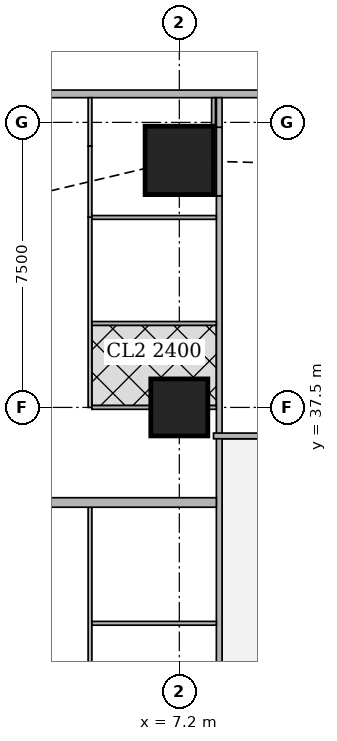
"""IFC4 building model, lengths in metres.
Left out: names, types, materials, properties, quantities, classifications, styles, units other than length and angle.
Written with IfcOpenShell. Run it as: python <this file> out.ifc"""

import sys

from ifc_helpers import new_model, si_unit, direction, frame, frame_2d, origin, origin_2d, place, context, subcontext, project, spatial, rectangle, extrude, element, fill, save


model = new_model("IFC4")
c1 = context("Model", 3, precision=1e-05, world=origin(), true_north=direction((0.0, 1.0)))
c2 = subcontext(c1, "Body", "Model", "MODEL_VIEW")
j1 = project(units=[si_unit("LENGTHUNIT", "METRE"), si_unit("PLANEANGLEUNIT", "RADIAN")], contexts=[c1])
p1 = place(None, origin())
s1 = spatial("IfcSite", under=j1, at=p1, CompositionType="ELEMENT")
p2 = place(p1, origin())
s2 = spatial("IfcBuilding", under=s1, at=p2, CompositionType="ELEMENT")
p3 = place(p2, frame((0.0, 0.0, 169.55)))
s3 = spatial("IfcBuildingStorey", under=s2, at=p3, CompositionType="ELEMENT", Elevation=169.55)
p4 = place(p3, frame((7.2, 37.5, 0.0), z_axis=(0.0, 0.0, 1.0), x_axis=(1.0, 0.0, 0.0)))
e1 = element("IfcColumn", 1, at=p4, inside=s3, PredefinedType="COLUMN", context=c2, shape_type="SweptSolid", body=[
    extrude(rectangle(XDim=1.5, YDim=1.5, at=origin_2d()), origin(), (0.0, 0.0, 1.0), 3.75),
])
p5 = place(p3, frame((7.2, 44.0, 0.0), z_axis=(0.0, 0.0, 1.0), x_axis=(1.0, 0.0, 0.0)))
e2 = element("IfcColumn", 2, at=p5, inside=s3, PredefinedType="COLUMN", context=c2, shape_type="SweptSolid", body=[
    extrude(rectangle(XDim=1.8, YDim=1.8, at=origin_2d()), origin(), (0.0, 0.0, 1.0), 3.75),
])
p6 = place(p3, frame((40.106, 45.75, 0.0), z_axis=(0.0, 0.0, 1.0), x_axis=(-1.0, 0.0, 0.0)))
e3 = element("IfcWall", 3, at=p6, inside=s3, PredefinedType="SOLIDWALL", context=c2, shape_type="SweptSolid", body=[
    extrude(rectangle(XDim=37.943, YDim=0.2, at=frame_2d((18.971, 0.0))), origin(), (0.0, 0.0, 1.0), 3.5),
])
p7 = place(p6, frame((8.606, 0.0, 0.9)))
e4 = element("IfcOpeningElement", 4, at=p7, cuts=e3, PredefinedType="OPENING", context=c2, shape_type="SweptSolid", body=[
    extrude(rectangle(XDim=1.8, YDim=1.5, at=frame_2d((0.9, 0.75))), frame((0.0, 0.11, 0.0), z_axis=(0.0, -1.0, 0.0), x_axis=(1.0, 0.0, 0.0)), (0.0, 0.0, 1.0), 0.22),
])
p8 = place(p6, frame((12.206, 0.0, 0.9)))
e5 = element("IfcOpeningElement", 5, at=p8, cuts=e3, PredefinedType="OPENING", context=c2, shape_type="SweptSolid", body=[
    extrude(rectangle(XDim=1.8, YDim=1.5, at=frame_2d((0.9, 0.75))), frame((0.0, 0.11, 0.0), z_axis=(0.0, -1.0, 0.0), x_axis=(1.0, 0.0, 0.0)), (0.0, 0.0, 1.0), 0.22),
])
p9 = place(p6, frame((15.806, 0.0, 0.9)))
e6 = element("IfcOpeningElement", 6, at=p9, cuts=e3, PredefinedType="OPENING", context=c2, shape_type="SweptSolid", body=[
    extrude(rectangle(XDim=1.8, YDim=1.5, at=frame_2d((0.9, 0.75))), frame((0.0, 0.11, 0.0), z_axis=(0.0, -1.0, 0.0), x_axis=(1.0, 0.0, 0.0)), (0.0, 0.0, 1.0), 0.22),
])
p10 = place(p6, frame((19.406, 0.0, 0.9)))
e7 = element("IfcOpeningElement", 7, at=p10, cuts=e3, PredefinedType="OPENING", context=c2, shape_type="SweptSolid", body=[
    extrude(rectangle(XDim=1.8, YDim=1.5, at=frame_2d((0.9, 0.75))), frame((0.0, 0.11, 0.0), z_axis=(0.0, -1.0, 0.0), x_axis=(1.0, 0.0, 0.0)), (0.0, 0.0, 1.0), 0.22),
])
p11 = place(p6, frame((23.006, 0.0, 0.9)))
e8 = element("IfcOpeningElement", 8, at=p11, cuts=e3, PredefinedType="OPENING", context=c2, shape_type="SweptSolid", body=[
    extrude(rectangle(XDim=1.8, YDim=1.5, at=frame_2d((0.9, 0.75))), frame((0.0, 0.11, 0.0), z_axis=(0.0, -1.0, 0.0), x_axis=(1.0, 0.0, 0.0)), (0.0, 0.0, 1.0), 0.22),
])
p12 = place(p6, frame((26.606, 0.0, 0.9)))
e9 = element("IfcOpeningElement", 9, at=p12, cuts=e3, PredefinedType="OPENING", context=c2, shape_type="SweptSolid", body=[
    extrude(rectangle(XDim=1.8, YDim=1.5, at=frame_2d((0.9, 0.75))), frame((0.0, 0.11, 0.0), z_axis=(0.0, -1.0, 0.0), x_axis=(1.0, 0.0, 0.0)), (0.0, 0.0, 1.0), 0.22),
])
p13 = place(p3, frame((8.25, 1.957, 0.0), z_axis=(0.0, 0.0, 1.0), x_axis=(0.0, 1.0, 0.0)))
e10 = element("IfcWall", 10, at=p13, inside=s3, PredefinedType="SOLIDWALL", context=c2, shape_type="SweptSolid", body=[
    extrude(rectangle(XDim=41.111, YDim=0.15, at=frame_2d((20.556, 0.0))), origin(), (0.0, 0.0, 1.0), 3.5),
])
p14 = place(p13, frame((10.642, 0.0, 0.0)))
e11 = element("IfcOpeningElement", 11, at=p14, cuts=e10, PredefinedType="OPENING", context=c2, shape_type="SweptSolid", body=[
    extrude(rectangle(XDim=1.0, YDim=2.1, at=frame_2d((0.5, 1.05))), frame((0.0, 0.085, 0.0), z_axis=(0.0, -1.0, 0.0), x_axis=(1.0, 0.0, 0.0)), (0.0, 0.0, 1.0), 0.17),
])
p15 = place(p13, frame((15.042, 0.0, 0.0)))
e12 = element("IfcOpeningElement", 12, at=p15, cuts=e10, PredefinedType="OPENING", context=c2, shape_type="SweptSolid", body=[
    extrude(rectangle(XDim=1.0, YDim=2.1, at=frame_2d((0.5, 1.05))), frame((0.0, 0.085, 0.0), z_axis=(0.0, -1.0, 0.0), x_axis=(1.0, 0.0, 0.0)), (0.0, 0.0, 1.0), 0.17),
])
p16 = place(p13, frame((22.543, 0.0, 0.0)))
e13 = element("IfcOpeningElement", 13, at=p16, cuts=e10, PredefinedType="OPENING", context=c2, shape_type="SweptSolid", body=[
    extrude(rectangle(XDim=1.0, YDim=2.1, at=frame_2d((0.5, 1.05))), frame((0.0, 0.085, 0.0), z_axis=(0.0, -1.0, 0.0), x_axis=(1.0, 0.0, 0.0)), (0.0, 0.0, 1.0), 0.17),
])
p17 = place(p13, frame((33.142, 0.0, 0.0)))
e14 = element("IfcOpeningElement", 14, at=p17, cuts=e10, PredefinedType="OPENING", context=c2, shape_type="SweptSolid", body=[
    extrude(rectangle(XDim=1.0, YDim=2.1, at=frame_2d((0.5, 1.05))), frame((0.0, 0.085, 0.0), z_axis=(0.0, -1.0, 0.0), x_axis=(1.0, 0.0, 0.0)), (0.0, 0.0, 1.0), 0.17),
])
p18 = place(p3, frame((8.25, 43.068, 0.0), z_axis=(0.0, 0.0, 1.0), x_axis=(0.0, 1.0, 0.0)))
e15 = element("IfcWall", 15, at=p18, inside=s3, PredefinedType="SOLIDWALL", context=c2, shape_type="SweptSolid", body=[
    extrude(rectangle(XDim=1.805, YDim=0.15, at=frame_2d((0.902, 0.0))), origin(), (0.0, 0.0, 1.0), 2.1),
])
p19 = place(p3, frame((8.25, 44.873, 0.0), z_axis=(0.0, 0.0, 1.0), x_axis=(0.0, 1.0, 0.0)))
e16 = element("IfcWall", 16, at=p19, inside=s3, PredefinedType="SOLIDWALL", context=c2, shape_type="SweptSolid", body=[
    extrude(rectangle(XDim=0.777, YDim=0.15, at=frame_2d((0.388, 0.0))), origin(), (0.0, 0.0, 1.0), 3.5),
])
p20 = place(p3, frame((8.1, 36.75, 0.0), z_axis=(0.0, 0.0, 1.0), x_axis=(1.0, 0.0, 0.0)))
e17 = element("IfcWall", 17, at=p20, inside=s3, PredefinedType="SOLIDWALL", context=c2, shape_type="SweptSolid", body=[
    extrude(rectangle(XDim=5.549, YDim=0.15, at=frame_2d((2.774, 0.0))), origin(), (0.0, 0.0, 1.0), 3.5),
])
p21 = place(p20, frame((2.725, 0.0, 0.0)))
e18 = element("IfcOpeningElement", 18, at=p21, cuts=e17, PredefinedType="OPENING", context=c2, shape_type="SweptSolid", body=[
    extrude(rectangle(XDim=1.0, YDim=2.1, at=frame_2d((0.5, 1.05))), frame((0.0, 0.085, 0.0), z_axis=(0.0, -1.0, 0.0), x_axis=(1.0, 0.0, 0.0)), (0.0, 0.0, 1.0), 0.17),
])
p22 = place(p3, frame((8.1, 45.65, 0.0), z_axis=(0.0, 0.0, 1.0), x_axis=(0.0, -1.0, 0.0)))
e19 = element("IfcWall", 19, at=p22, inside=s3, PredefinedType="PARTITIONING", context=c2, shape_type="SweptSolid", body=[
    extrude(rectangle(XDim=0.749, YDim=0.1, at=frame_2d((0.375, 0.0))), origin(), (0.0, 0.0, 1.0), 3.5),
])
p23 = place(p3, frame((4.85, 27.499, 0.0), z_axis=(0.0, 0.0, 1.0), x_axis=(0.0, 1.0, 0.0)))
e20 = element("IfcWall", 20, at=p23, inside=s3, PredefinedType="PARTITIONING", context=c2, shape_type="SweptSolid", body=[
    extrude(rectangle(XDim=7.375, YDim=0.1, at=frame_2d((3.688, 0.0))), origin(), (0.0, 0.0, 1.0), 3.5),
])
p24 = place(p23, frame((0.8, 0.0, 0.0)))
e21 = element("IfcOpeningElement", 21, at=p24, cuts=e20, PredefinedType="OPENING", context=c2, shape_type="SweptSolid", body=[
    extrude(rectangle(XDim=0.9, YDim=2.1, at=frame_2d((0.45, 1.05))), frame((0.0, 0.06, 0.0), z_axis=(0.0, -1.0, 0.0), x_axis=(1.0, 0.0, 0.0)), (0.0, 0.0, 1.0), 0.12),
])
p25 = place(p23, frame((2.961, 0.0, 0.0)))
e22 = element("IfcOpeningElement", 22, at=p25, cuts=e20, PredefinedType="OPENING", context=c2, shape_type="SweptSolid", body=[
    extrude(rectangle(XDim=0.9, YDim=2.1, at=frame_2d((0.45, 1.05))), frame((0.0, 0.06, 0.0), z_axis=(0.0, -1.0, 0.0), x_axis=(1.0, 0.0, 0.0)), (0.0, 0.0, 1.0), 0.12),
])
p26 = place(p23, frame((5.461, 0.0, 0.0)))
e23 = element("IfcOpeningElement", 23, at=p26, cuts=e20, PredefinedType="OPENING", context=c2, shape_type="SweptSolid", body=[
    extrude(rectangle(XDim=0.9, YDim=2.1, at=frame_2d((0.45, 1.05))), frame((0.0, 0.06, 0.0), z_axis=(0.0, -1.0, 0.0), x_axis=(1.0, 0.0, 0.0)), (0.0, 0.0, 1.0), 0.12),
])
p27 = place(p3, frame((4.9, 31.82, 0.0), z_axis=(0.0, 0.0, 1.0), x_axis=(1.0, 0.0, 0.0)))
e24 = element("IfcWall", 24, at=p27, inside=s3, PredefinedType="PARTITIONING", context=c2, shape_type="SweptSolid", body=[
    extrude(rectangle(XDim=3.275, YDim=0.1, at=frame_2d((1.638, 0.0))), origin(), (0.0, 0.0, 1.0), 3.5),
])
p28 = place(p3, frame((4.85, 37.5, 0.0), z_axis=(0.0, 0.0, 1.0), x_axis=(0.0, 1.0, 0.0)))
e25 = element("IfcWall", 25, at=p28, inside=s3, PredefinedType="PARTITIONING", context=c2, shape_type="SweptSolid", body=[
    extrude(rectangle(XDim=5.007, YDim=0.1, at=frame_2d((2.503, 0.0))), origin(), (0.0, 0.0, 1.0), 3.5),
])
p29 = place(p28, frame((0.655, 0.0, 0.0)))
e26 = element("IfcOpeningElement", 26, at=p29, cuts=e25, PredefinedType="OPENING", context=c2, shape_type="SweptSolid", body=[
    extrude(rectangle(XDim=0.9, YDim=2.1, at=frame_2d((0.45, 1.05))), frame((0.0, 0.06, 0.0), z_axis=(0.0, -1.0, 0.0), x_axis=(1.0, 0.0, 0.0)), (0.0, 0.0, 1.0), 0.12),
])
p30 = place(p28, frame((3.155, 0.0, 0.0)))
e27 = element("IfcOpeningElement", 27, at=p30, cuts=e25, PredefinedType="OPENING", context=c2, shape_type="SweptSolid", body=[
    extrude(rectangle(XDim=0.9, YDim=2.1, at=frame_2d((0.45, 1.05))), frame((0.0, 0.06, 0.0), z_axis=(0.0, -1.0, 0.0), x_axis=(1.0, 0.0, 0.0)), (0.0, 0.0, 1.0), 0.12),
])
p31 = place(p3, frame((4.85, 42.507, 0.0), z_axis=(0.0, 0.0, 1.0), x_axis=(0.0, 1.0, 0.0)))
e28 = element("IfcWall", 28, at=p31, inside=s3, PredefinedType="PARTITIONING", context=c2, shape_type="SweptSolid", body=[
    extrude(rectangle(XDim=1.874, YDim=0.1, at=frame_2d((0.937, 0.0))), origin(), (0.0, 0.0, 1.0), 2.1),
])
p32 = place(p3, frame((4.85, 44.381, 0.0), z_axis=(0.0, 0.0, 1.0), x_axis=(0.0, 1.0, 0.0)))
e29 = element("IfcWall", 29, at=p32, inside=s3, PredefinedType="PARTITIONING", context=c2, shape_type="SweptSolid", body=[
    extrude(rectangle(XDim=1.269, YDim=0.1, at=frame_2d((0.634, 0.0))), origin(), (0.0, 0.0, 1.0), 3.5),
])
p33 = place(p32, frame((0.15, 0.0, 0.0)))
e30 = element("IfcOpeningElement", 30, at=p33, cuts=e29, PredefinedType="OPENING", context=c2, shape_type="SweptSolid", body=[
    extrude(rectangle(XDim=0.9, YDim=2.1, at=frame_2d((0.45, 1.05))), frame((0.0, 0.06, 0.0), z_axis=(0.0, -1.0, 0.0), x_axis=(1.0, 0.0, 0.0)), (0.0, 0.0, 1.0), 0.12),
])
p34 = place(p3, frame((4.9, 37.5, 0.0), z_axis=(0.0, 0.0, 1.0), x_axis=(1.0, 0.0, 0.0)))
e31 = element("IfcWall", 31, at=p34, inside=s3, PredefinedType="PARTITIONING", context=c2, shape_type="SweptSolid", body=[
    extrude(rectangle(XDim=1.549, YDim=0.1, at=frame_2d((0.774, 0.0))), origin(), (0.0, 0.0, 1.0), 3.5),
])
p35 = place(p3, frame((7.951, 37.5, 0.0), z_axis=(0.0, 0.0, 1.0), x_axis=(1.0, 0.0, 0.0)))
e32 = element("IfcWall", 32, at=p35, inside=s3, PredefinedType="PARTITIONING", context=c2, shape_type="SweptSolid", body=[
    extrude(rectangle(XDim=0.224, YDim=0.1, at=frame_2d((0.112, 0.0))), origin(), (0.0, 0.0, 1.0), 3.5),
])
for number, where, z_axis, x_axis in (
    (33, (4.9, 42.499, 0.0), (0.0, 0.0, 1.0), (1.0, 0.0, 0.0)),
    (34, (4.9, 39.71, 0.0), (0.0, 0.0, 1.0), (1.0, 0.0, 0.0)),
):
    element("IfcWall", number, at=place(p3, frame(where, z_axis=z_axis, x_axis=x_axis)), inside=s3, PredefinedType="PARTITIONING", context=c2, shape_type="SweptSolid", body=[
        extrude(rectangle(XDim=3.275, YDim=0.1, at=frame_2d((1.638, 0.0))), origin(), (0.0, 0.0, 1.0), 3.5),
    ])
p36 = place(p3, frame((3.65, 34.999, 0.0), z_axis=(0.0, 0.0, 1.0), x_axis=(1.0, 0.0, 0.0)))
e35 = element("IfcWall", 35, at=p36, inside=s3, PredefinedType="SOLIDWALL", context=c2, shape_type="SweptSolid", body=[
    extrude(rectangle(XDim=4.525, YDim=0.25, at=frame_2d((2.263, 0.0))), origin(), (0.0, 0.0, 1.0), 3.5),
])
p37 = place(p25, origin())
e36 = element("IfcDoor", 36, at=p37, inside=s3, OperationType="SINGLE_SWING_LEFT", PredefinedType="DOOR", context=c2, shape_type="SweptSolid", body=[
    extrude(rectangle(XDim=0.9, YDim=2.1, at=frame_2d((0.45, 1.05))), frame((0.0, 0.025, 0.0), z_axis=(0.0, -1.0, 0.0), x_axis=(1.0, 0.0, 0.0)), (0.0, 0.0, 1.0), 0.05),
])
fill(e22, e36)
p38 = place(p26, origin())
e37 = element("IfcDoor", 37, at=p38, inside=s3, OperationType="SINGLE_SWING_LEFT", PredefinedType="DOOR", context=c2, shape_type="SweptSolid", body=[
    extrude(rectangle(XDim=0.9, YDim=2.1, at=frame_2d((0.45, 1.05))), frame((0.0, 0.025, 0.0), z_axis=(0.0, -1.0, 0.0), x_axis=(1.0, 0.0, 0.0)), (0.0, 0.0, 1.0), 0.05),
])
fill(e23, e37)
p39 = place(p29, origin())
e38 = element("IfcDoor", 38, at=p39, inside=s3, OperationType="SINGLE_SWING_RIGHT", PredefinedType="DOOR", context=c2, shape_type="SweptSolid", body=[
    extrude(rectangle(XDim=0.9, YDim=2.1, at=frame_2d((0.45, 1.05))), frame((0.0, 0.025, 0.0), z_axis=(0.0, -1.0, 0.0), x_axis=(1.0, 0.0, 0.0)), (0.0, 0.0, 1.0), 0.05),
])
fill(e26, e38)
p40 = place(p33, origin())
e39 = element("IfcDoor", 39, at=p40, inside=s3, OperationType="SINGLE_SWING_RIGHT", PredefinedType="DOOR", context=c2, shape_type="SweptSolid", body=[
    extrude(rectangle(XDim=0.9, YDim=2.1, at=frame_2d((0.45, 1.05))), frame((0.0, 0.025, 0.0), z_axis=(0.0, -1.0, 0.0), x_axis=(1.0, 0.0, 0.0)), (0.0, 0.0, 1.0), 0.05),
])
fill(e30, e39)
p41 = place(p30, origin())
e40 = element("IfcDoor", 40, at=p41, inside=s3, OperationType="SINGLE_SWING_LEFT", PredefinedType="DOOR", context=c2, shape_type="SweptSolid", body=[
    extrude(rectangle(XDim=0.9, YDim=2.1, at=frame_2d((0.45, 1.05))), frame((0.0, 0.025, 0.0), z_axis=(0.0, -1.0, 0.0), x_axis=(1.0, 0.0, 0.0)), (0.0, 0.0, 1.0), 0.05),
])
fill(e27, e40)
p42 = place(p17, origin())
e41 = element("IfcDoor", 41, at=p42, inside=s3, OperationType="SINGLE_SWING_LEFT", PredefinedType="DOOR", context=c2, shape_type="SweptSolid", body=[
    extrude(rectangle(XDim=1.0, YDim=2.1, at=frame_2d((0.5, 1.05))), frame((0.0, 0.025, 0.0), z_axis=(0.0, -1.0, 0.0), x_axis=(1.0, 0.0, 0.0)), (0.0, 0.0, 1.0), 0.05),
])
fill(e14, e41)
save(model, sys.argv[1])
